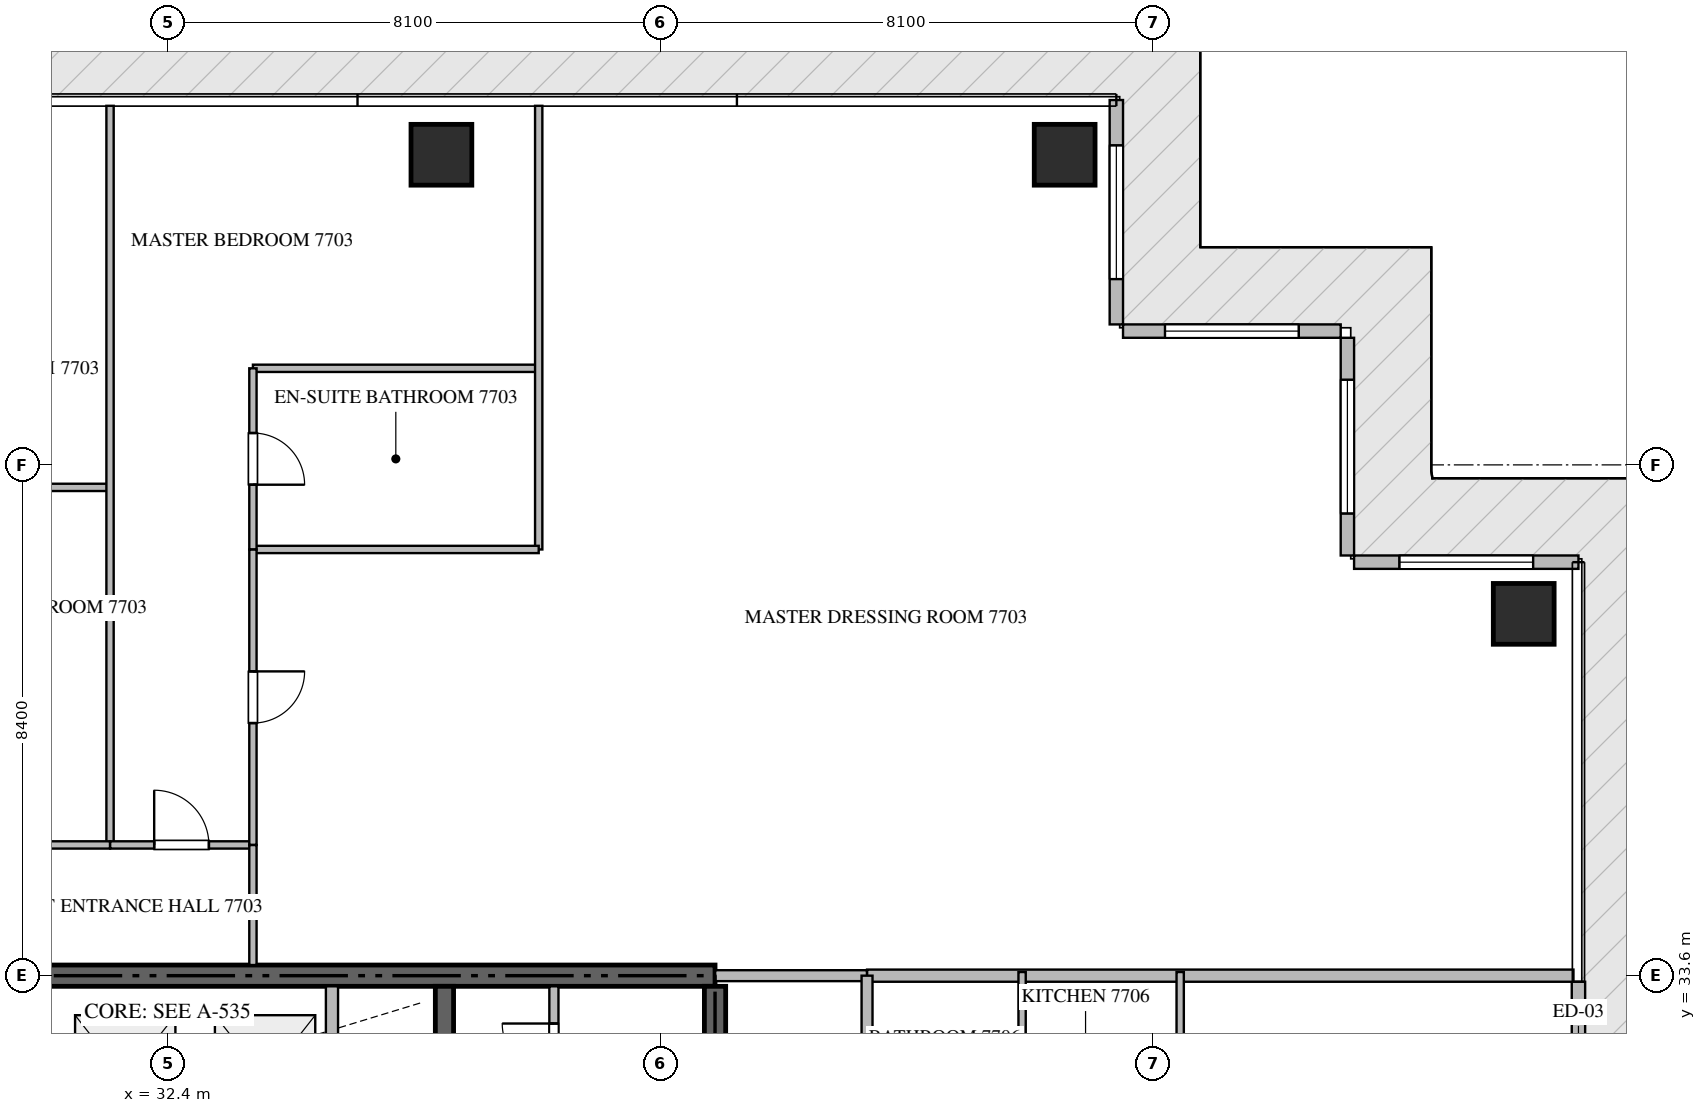
"""IFC4 building model, lengths in metres.
Left out: names, types, materials, properties, quantities, classifications, styles, units other than length and angle.
Written with IfcOpenShell. Run it as: python <this file> out.ifc"""

import sys

from ifc_helpers import new_model, si_unit, direction, frame, frame_2d, origin, origin_2d, place, context, subcontext, project, spatial, rectangle, extrude, source, transform, mapped, element, fill, save


model = new_model("IFC4")
c1 = context("Model", 3, precision=1e-05, world=origin(), true_north=direction((0.0, 1.0)))
c2 = subcontext(c1, "Body", "Model", "MODEL_VIEW")
j1 = project(units=[si_unit("LENGTHUNIT", "METRE"), si_unit("PLANEANGLEUNIT", "RADIAN")], contexts=[c1])
p1 = place(None, origin())
s1 = spatial("IfcSite", under=j1, at=p1, CompositionType="ELEMENT")
p2 = place(p1, origin())
s2 = spatial("IfcBuilding", under=s1, at=p2, CompositionType="ELEMENT")
p3 = place(p2, frame((0.0, 0.0, 309.65)))
s3 = spatial("IfcBuildingStorey", under=s2, at=p3, CompositionType="ELEMENT", Elevation=309.65)
p4 = place(p3, frame((41.4, 33.6, -0.26), z_axis=(0.0, 0.0, 1.0), x_axis=(-1.0, 0.0, 0.0)))
e1 = element("IfcWall", 1, at=p4, inside=s3, PredefinedType="SHEAR", context=c2, shape_type="SweptSolid", body=[
    extrude(rectangle(XDim=18.0, YDim=0.35, at=frame_2d((9.0, 0.0))), origin(), (0.0, 0.0, 1.0), 4.048),
])
p5 = place(p3, frame((41.4, 27.75, -0.26), z_axis=(0.0, 0.0, 1.0), x_axis=(0.0, 1.0, 0.0)))
e2 = element("IfcWall", 2, at=p5, inside=s3, PredefinedType="SHEAR", context=c2, shape_type="SweptSolid", body=[
    extrude(rectangle(XDim=5.675, YDim=0.35, at=frame_2d((2.837, 0.0))), origin(), (0.0, 0.0, 1.0), 4.048),
])
p6 = place(p3, frame((36.95, 27.05, -0.26), z_axis=(0.0, 0.0, 1.0), x_axis=(0.0, 1.0, 0.0)))
e3 = element("IfcWall", 3, at=p6, inside=s3, PredefinedType="SHEAR", context=c2, shape_type="SweptSolid", body=[
    extrude(rectangle(XDim=6.375, YDim=0.3, at=frame_2d((3.188, 0.0))), origin(), (0.0, 0.0, 1.0), 4.048),
])
m1 = source(origin(), c2, "Body", "SweptSolid", [
    extrude(rectangle(XDim=1.0, YDim=1.0, at=origin_2d()), origin(), (0.0, 0.0, 1.0), 4.05),
])
for number, where, z_axis, x_axis in (
    (4, (36.9, 47.1, -0.26), (0.0, 0.0, 1.0), (1.0, 0.0, 0.0)),
    (5, (47.15, 47.1, -0.26), (0.0, 0.0, 1.0), (1.0, 0.0, 0.0)),
    (6, (54.7, 39.55, -0.26), (0.0, 0.0, 1.0), (1.0, 0.0, 0.0)),
):
    element("IfcColumn", number, at=place(p3, frame(where, z_axis=z_axis, x_axis=x_axis)), inside=s3, PredefinedType="COLUMN", context=c2, shape_type="MappedRepresentation", body=[
        mapped(m1, transform((0.0, 0.0, 0.0), scale=1.0)),
    ])
p7 = place(p3, frame((55.6, 30.5, 0.0), z_axis=(0.0, 0.0, 1.0), x_axis=(0.0, 1.0, 0.0)))
e7 = element("IfcWall", 7, at=p7, inside=s3, PredefinedType="ELEMENTEDWALL", context=c2, shape_type="SweptSolid", body=[
    extrude(rectangle(XDim=3.0, YDim=0.22, at=frame_2d((1.5, 0.0))), origin(), (0.0, 0.0, 1.0), 3.775),
])
p8 = place(p7, frame((0.95, 0.0, 0.0)))
e8 = element("IfcOpeningElement", 8, at=p8, cuts=e7, PredefinedType="OPENING", context=c2, shape_type="SweptSolid", body=[
    extrude(rectangle(XDim=1.1, YDim=2.2, at=frame_2d((0.55, 1.1))), frame((0.0, 0.12, 0.0), z_axis=(0.0, -1.0, 0.0), x_axis=(1.0, 0.0, 0.0)), (0.0, 0.0, 1.0), 0.24),
])
p9 = place(p3, frame((55.6, 40.4, 0.0), z_axis=(0.0, 0.0, 1.0), x_axis=(-1.0, 0.0, 0.0)))
e9 = element("IfcWall", 9, at=p9, inside=s3, PredefinedType="ELEMENTEDWALL", context=c2, shape_type="SweptSolid", body=[
    extrude(rectangle(XDim=3.69, YDim=0.22, at=frame_2d((1.845, 0.0))), origin(), (0.0, 0.0, 1.0), 3.775),
])
p10 = place(p9, frame((0.745, 0.0, 0.65)))
e10 = element("IfcOpeningElement", 10, at=p10, cuts=e9, PredefinedType="OPENING", context=c2, shape_type="SweptSolid", body=[
    extrude(rectangle(XDim=2.2, YDim=2.4, at=frame_2d((1.1, 1.2))), frame((0.0, 0.12, 0.0), z_axis=(0.0, -1.0, 0.0), x_axis=(1.0, 0.0, 0.0)), (0.0, 0.0, 1.0), 0.24),
])
p11 = place(p3, frame((51.8, 40.51, 0.0), z_axis=(0.0, 0.0, 1.0), x_axis=(0.0, 1.0, 0.0)))
e11 = element("IfcWall", 11, at=p11, inside=s3, PredefinedType="ELEMENTEDWALL", context=c2, shape_type="SweptSolid", body=[
    extrude(rectangle(XDim=3.58, YDim=0.22, at=frame_2d((1.79, 0.0))), origin(), (0.0, 0.0, 1.0), 3.775),
])
p12 = place(p11, frame((0.69, 0.0, 0.65)))
e12 = element("IfcOpeningElement", 12, at=p12, cuts=e11, PredefinedType="OPENING", context=c2, shape_type="SweptSolid", body=[
    extrude(rectangle(XDim=2.2, YDim=2.4, at=frame_2d((1.1, 1.2))), frame((0.0, 0.12, 0.0), z_axis=(0.0, -1.0, 0.0), x_axis=(1.0, 0.0, 0.0)), (0.0, 0.0, 1.0), 0.24),
])
p13 = place(p3, frame((51.69, 44.2, 0.0), z_axis=(0.0, 0.0, 1.0), x_axis=(-1.0, 0.0, 0.0)))
e13 = element("IfcWall", 13, at=p13, inside=s3, PredefinedType="ELEMENTEDWALL", context=c2, shape_type="SweptSolid", body=[
    extrude(rectangle(XDim=3.58, YDim=0.22, at=frame_2d((1.79, 0.0))), origin(), (0.0, 0.0, 1.0), 3.775),
])
p14 = place(p13, frame((0.69, 0.0, 0.65)))
e14 = element("IfcOpeningElement", 14, at=p14, cuts=e13, PredefinedType="OPENING", context=c2, shape_type="SweptSolid", body=[
    extrude(rectangle(XDim=2.2, YDim=2.4, at=frame_2d((1.1, 1.2))), frame((0.0, 0.12, 0.0), z_axis=(0.0, -1.0, 0.0), x_axis=(1.0, 0.0, 0.0)), (0.0, 0.0, 1.0), 0.24),
])
p15 = place(p3, frame((48.0, 44.31, 0.0), z_axis=(0.0, 0.0, 1.0), x_axis=(0.0, 1.0, 0.0)))
e15 = element("IfcWall", 15, at=p15, inside=s3, PredefinedType="ELEMENTEDWALL", context=c2, shape_type="SweptSolid", body=[
    extrude(rectangle(XDim=3.69, YDim=0.22, at=frame_2d((1.845, 0.0))), origin(), (0.0, 0.0, 1.0), 3.775),
])
p16 = place(p15, frame((0.745, 0.0, 0.65)))
e16 = element("IfcOpeningElement", 16, at=p16, cuts=e15, PredefinedType="OPENING", context=c2, shape_type="SweptSolid", body=[
    extrude(rectangle(XDim=2.2, YDim=2.4, at=frame_2d((1.1, 1.2))), frame((0.0, 0.12, 0.0), z_axis=(0.0, -1.0, 0.0), x_axis=(1.0, 0.0, 0.0)), (0.0, 0.0, 1.0), 0.24),
])
p17 = place(p3, frame((35.1, 30.75, 0.0), z_axis=(0.0, 0.0, 1.0), x_axis=(0.0, 1.0, 0.0)))
e17 = element("IfcWall", 17, at=p17, inside=s3, PredefinedType="STANDARD", context=c2, shape_type="SweptSolid", body=[
    extrude(rectangle(XDim=2.675, YDim=0.2, at=frame_2d((1.337, 0.0))), origin(), (0.0, 0.0, 1.0), 3.79),
])
p18 = place(p3, frame((38.75, 31.352, 0.0), z_axis=(0.0, 0.0, 1.0), x_axis=(0.0, 1.0, 0.0)))
e18 = element("IfcWall", 18, at=p18, inside=s3, PredefinedType="PARTITIONING", context=c2, shape_type="SweptSolid", body=[
    extrude(rectangle(XDim=2.073, YDim=0.15, at=frame_2d((1.037, 0.0))), origin(), (0.0, 0.0, 1.0), 3.79),
])
p19 = place(p18, frame((0.611, 0.0, 0.0)))
e19 = element("IfcOpeningElement", 19, at=p19, cuts=e18, PredefinedType="OPENING", context=c2, shape_type="SweptSolid", body=[
    extrude(rectangle(XDim=0.85, YDim=2.1, at=frame_2d((0.425, 1.05))), frame((0.0, 0.085, 0.0), z_axis=(0.0, -1.0, 0.0), x_axis=(1.0, 0.0, 0.0)), (0.0, 0.0, 1.0), 0.17),
])
p20 = place(p3, frame((43.9, 33.6, 0.0), z_axis=(0.0, 0.0, 1.0), x_axis=(1.0, 0.0, 0.0)))
e20 = element("IfcWall", 20, at=p20, inside=s3, PredefinedType="PARTITIONING", context=c2, shape_type="SweptSolid", body=[
    extrude(rectangle(XDim=11.618, YDim=0.2, at=frame_2d((5.809, 0.0))), origin(), (0.0, 0.0, 1.0), 3.79),
])
p21 = place(p3, frame((41.402, 33.6, 0.0), z_axis=(0.0, 0.0, 1.0), x_axis=(1.0, 0.0, 0.0)))
e21 = element("IfcWall", 21, at=p21, inside=s3, PredefinedType="PARTITIONING", context=c2, shape_type="SweptSolid", body=[
    extrude(rectangle(XDim=2.496, YDim=0.18, at=frame_2d((1.248, 0.0))), origin(), (0.0, 0.0, 1.0), 3.79),
])
p22 = place(p3, frame((43.9, 16.8, 0.0), z_axis=(0.0, 0.0, 1.0), x_axis=(0.0, 1.0, 0.0)))
e22 = element("IfcWall", 22, at=p22, inside=s3, PredefinedType="PARTITIONING", context=c2, shape_type="SweptSolid", body=[
    extrude(rectangle(XDim=16.8, YDim=0.18, at=frame_2d((8.4, 0.0))), origin(), (0.0, 0.0, 1.0), 3.79),
])
p23 = place(p22, frame((2.575, 0.0, 0.0)))
e23 = element("IfcOpeningElement", 23, at=p23, cuts=e22, PredefinedType="OPENING", context=c2, shape_type="SweptSolid", body=[
    extrude(rectangle(XDim=1.0, YDim=2.15, at=frame_2d((0.5, 1.075))), frame((0.0, 0.1, 0.0), z_axis=(0.0, -1.0, 0.0), x_axis=(1.0, 0.0, 0.0)), (0.0, 0.0, 1.0), 0.2),
])
p24 = place(p22, frame((10.997, 0.0, 0.0)))
e24 = element("IfcOpeningElement", 24, at=p24, cuts=e22, PredefinedType="OPENING", context=c2, shape_type="SweptSolid", body=[
    extrude(rectangle(XDim=1.0, YDim=2.15, at=frame_2d((0.5, 1.075))), frame((0.0, 0.1, 0.0), z_axis=(0.0, -1.0, 0.0), x_axis=(1.0, 0.0, 0.0)), (0.0, 0.0, 1.0), 0.2),
])
p25 = place(p3, frame((26.3, 41.63, 0.0), z_axis=(0.0, 0.0, 1.0), x_axis=(1.0, 0.0, 0.0)))
e25 = element("IfcWall", 25, at=p25, inside=s3, PredefinedType="PARTITIONING", context=c2, shape_type="SweptSolid", body=[
    extrude(rectangle(XDim=5.15, YDim=0.12, at=frame_2d((2.575, 0.0))), origin(), (0.0, 0.0, 1.0), 3.79),
])
p26 = place(p3, frame((31.45, 47.905, 0.0), z_axis=(0.0, 0.0, 1.0), x_axis=(0.0, -1.0, 0.0)))
e26 = element("IfcWall", 26, at=p26, inside=s3, PredefinedType="PARTITIONING", context=c2, shape_type="SweptSolid", body=[
    extrude(rectangle(XDim=12.155, YDim=0.12, at=frame_2d((6.078, 0.0))), origin(), (0.0, 0.0, 1.0), 3.79),
])
p27 = place(p3, frame((28.402, 35.75, 0.0), z_axis=(0.0, 0.0, 1.0), x_axis=(1.0, 0.0, 0.0)))
e27 = element("IfcWall", 27, at=p27, inside=s3, PredefinedType="PARTITIONING", context=c2, shape_type="SweptSolid", body=[
    extrude(rectangle(XDim=3.048, YDim=0.12, at=frame_2d((1.524, 0.0))), origin(), (0.0, 0.0, 1.0), 3.79),
])
p28 = place(p27, frame((1.099, 0.0, 0.0)))
e28 = element("IfcOpeningElement", 28, at=p28, cuts=e27, PredefinedType="OPENING", context=c2, shape_type="SweptSolid", body=[
    extrude(rectangle(XDim=0.85, YDim=2.1, at=frame_2d((0.425, 1.05))), frame((0.0, 0.07, 0.0), z_axis=(0.0, -1.0, 0.0), x_axis=(1.0, 0.0, 0.0)), (0.0, 0.0, 1.0), 0.14),
])
p29 = place(p3, frame((31.452, 35.75, 0.0), z_axis=(0.0, 0.0, 1.0), x_axis=(1.0, 0.0, 0.0)))
e29 = element("IfcWall", 29, at=p29, inside=s3, PredefinedType="PARTITIONING", context=c2, shape_type="SweptSolid", body=[
    extrude(rectangle(XDim=2.348, YDim=0.12, at=frame_2d((1.174, 0.0))), origin(), (0.0, 0.0, 1.0), 3.79),
])
p30 = place(p29, frame((0.724, 0.0, 0.0)))
e30 = element("IfcOpeningElement", 30, at=p30, cuts=e29, PredefinedType="OPENING", context=c2, shape_type="SweptSolid", body=[
    extrude(rectangle(XDim=0.9, YDim=2.1, at=frame_2d((0.45, 1.05))), frame((0.0, 0.07, 0.0), z_axis=(0.0, -1.0, 0.0), x_axis=(1.0, 0.0, 0.0)), (0.0, 0.0, 1.0), 0.14),
])
p31 = place(p3, frame((33.8, 43.588, 0.0), z_axis=(0.0, 0.0, 1.0), x_axis=(1.0, 0.0, 0.0)))
e31 = element("IfcWall", 31, at=p31, inside=s3, PredefinedType="PARTITIONING", context=c2, shape_type="SweptSolid", body=[
    extrude(rectangle(XDim=4.7, YDim=0.12, at=frame_2d((2.35, 0.0))), origin(), (0.0, 0.0, 1.0), 3.79),
])
p32 = place(p3, frame((38.5, 47.905, 0.0), z_axis=(0.0, 0.0, 1.0), x_axis=(0.0, -1.0, 0.0)))
e32 = element("IfcWall", 32, at=p32, inside=s3, PredefinedType="PARTITIONING", context=c2, shape_type="SweptSolid", body=[
    extrude(rectangle(XDim=7.296, YDim=0.12, at=frame_2d((3.648, 0.0))), origin(), (0.0, 0.0, 1.0), 3.79),
])
p33 = place(p3, frame((33.8, 40.609, 0.0), z_axis=(0.0, 0.0, 1.0), x_axis=(1.0, 0.0, 0.0)))
e33 = element("IfcWall", 33, at=p33, inside=s3, PredefinedType="PARTITIONING", context=c2, shape_type="SweptSolid", body=[
    extrude(rectangle(XDim=4.7, YDim=0.12, at=frame_2d((2.35, 0.0))), origin(), (0.0, 0.0, 1.0), 3.79),
])
p34 = place(p3, frame((33.8, 43.588, 0.0), z_axis=(0.0, 0.0, 1.0), x_axis=(0.0, -1.0, 0.0)))
e34 = element("IfcWall", 34, at=p34, inside=s3, PredefinedType="PARTITIONING", context=c2, shape_type="SweptSolid", body=[
    extrude(rectangle(XDim=2.979, YDim=0.12, at=frame_2d((1.49, 0.0))), origin(), (0.0, 0.0, 1.0), 3.79),
])
p35 = place(p34, frame((1.064, 0.0, 0.0)))
e35 = element("IfcOpeningElement", 35, at=p35, cuts=e34, PredefinedType="OPENING", context=c2, shape_type="SweptSolid", body=[
    extrude(rectangle(XDim=0.85, YDim=2.1, at=frame_2d((0.425, 1.05))), frame((0.0, 0.07, 0.0), z_axis=(0.0, -1.0, 0.0), x_axis=(1.0, 0.0, 0.0)), (0.0, 0.0, 1.0), 0.14),
])
p36 = place(p3, frame((33.8, 40.607, 0.0), z_axis=(0.0, 0.0, 1.0), x_axis=(0.0, -1.0, 0.0)))
e36 = element("IfcWall", 36, at=p36, inside=s3, PredefinedType="PARTITIONING", context=c2, shape_type="SweptSolid", body=[
    extrude(rectangle(XDim=4.857, YDim=0.12, at=frame_2d((2.428, 0.0))), origin(), (0.0, 0.0, 1.0), 3.79),
])
p37 = place(p36, frame((2.003, 0.0, 0.0)))
e37 = element("IfcOpeningElement", 37, at=p37, cuts=e36, PredefinedType="OPENING", context=c2, shape_type="SweptSolid", body=[
    extrude(rectangle(XDim=0.85, YDim=2.1, at=frame_2d((0.425, 1.05))), frame((0.0, 0.07, 0.0), z_axis=(0.0, -1.0, 0.0), x_axis=(1.0, 0.0, 0.0)), (0.0, 0.0, 1.0), 0.14),
])
p38 = place(p3, frame((33.8, 35.748, 0.0), z_axis=(0.0, 0.0, 1.0), x_axis=(0.0, -1.0, 0.0)))
e38 = element("IfcWall", 38, at=p38, inside=s3, PredefinedType="PARTITIONING", context=c2, shape_type="SweptSolid", body=[
    extrude(rectangle(XDim=1.973, YDim=0.12, at=frame_2d((0.987, 0.0))), origin(), (0.0, 0.0, 1.0), 3.79),
])
for number, where, z_axis, x_axis in (
    (39, (46.45, 31.0, 0.0), (0.0, 0.0, 1.0), (0.0, 1.0, 0.0)),
    (40, (49.05, 31.0, 0.0), (0.0, 0.0, 1.0), (0.0, 1.0, 0.0)),
):
    element("IfcWall", number, at=place(p3, frame(where, z_axis=z_axis, x_axis=x_axis)), inside=s3, PredefinedType="PARTITIONING", context=c2, shape_type="SweptSolid", body=[
        extrude(rectangle(XDim=2.66, YDim=0.12, at=frame_2d((1.33, 0.0))), origin(), (0.0, 0.0, 1.0), 3.79),
    ])
m2 = source(origin(), c2, "Body", "SweptSolid", [
    extrude(rectangle(XDim=2.2, YDim=2.4, at=frame_2d((1.1, 1.2))), frame((0.0, 0.03, 0.0), z_axis=(0.0, -1.0, 0.0), x_axis=(1.0, 0.0, 0.0)), (0.0, 0.0, 1.0), 0.06),
])
p39 = place(p10, origin())
e41 = element("IfcWindow", 41, at=p39, inside=s3, PartitioningType="SINGLE_PANEL", PredefinedType="WINDOW", context=c2, shape_type="MappedRepresentation", body=[
    mapped(m2, transform((0.0, 0.0, 0.0), scale=1.0)),
])
fill(e10, e41)
p40 = place(p12, origin())
e42 = element("IfcWindow", 42, at=p40, inside=s3, PartitioningType="SINGLE_PANEL", PredefinedType="WINDOW", context=c2, shape_type="MappedRepresentation", body=[
    mapped(m2, transform((0.0, 0.0, 0.0), scale=1.0)),
])
fill(e12, e42)
p41 = place(p14, origin())
e43 = element("IfcWindow", 43, at=p41, inside=s3, PartitioningType="SINGLE_PANEL", PredefinedType="WINDOW", context=c2, shape_type="MappedRepresentation", body=[
    mapped(m2, transform((0.0, 0.0, 0.0), scale=1.0)),
])
fill(e14, e43)
p42 = place(p16, origin())
e44 = element("IfcWindow", 44, at=p42, inside=s3, PartitioningType="SINGLE_PANEL", PredefinedType="WINDOW", context=c2, shape_type="MappedRepresentation", body=[
    mapped(m2, transform((0.0, 0.0, 0.0), scale=1.0)),
])
fill(e16, e44)
m3 = source(origin(), c2, "Body", "SweptSolid", [
    extrude(rectangle(XDim=0.85, YDim=2.1, at=frame_2d((0.425, 1.05))), frame((0.0, 0.025, 0.0), z_axis=(0.0, -1.0, 0.0), x_axis=(1.0, 0.0, 0.0)), (0.0, 0.0, 1.0), 0.05),
])
p43 = place(p19, origin())
e45 = element("IfcDoor", 45, at=p43, inside=s3, OperationType="SINGLE_SWING_RIGHT", PredefinedType="DOOR", context=c2, shape_type="MappedRepresentation", body=[
    mapped(m3, transform((0.0, 0.0, 0.0), scale=1.0)),
])
fill(e19, e45)
m4 = source(origin(), c2, "Body", "SweptSolid", [
    extrude(rectangle(XDim=0.9, YDim=2.1, at=frame_2d((0.45, 1.05))), frame((0.0, 0.025, 0.0), z_axis=(0.0, -1.0, 0.0), x_axis=(1.0, 0.0, 0.0)), (0.0, 0.0, 1.0), 0.05),
])
p44 = place(p30, origin())
e46 = element("IfcDoor", 46, at=p44, inside=s3, OperationType="SINGLE_SWING_LEFT", PredefinedType="DOOR", context=c2, shape_type="MappedRepresentation", body=[
    mapped(m4, transform((0.0, 0.0, 0.0), scale=1.0)),
])
fill(e30, e46)
p45 = place(p35, origin())
e47 = element("IfcDoor", 47, at=p45, inside=s3, OperationType="SINGLE_SWING_RIGHT", PredefinedType="DOOR", context=c2, shape_type="MappedRepresentation", body=[
    mapped(m3, transform((0.0, 0.0, 0.0), scale=1.0)),
])
fill(e35, e47)
p46 = place(p37, origin())
e48 = element("IfcDoor", 48, at=p46, inside=s3, OperationType="SINGLE_SWING_LEFT", PredefinedType="DOOR", context=c2, shape_type="MappedRepresentation", body=[
    mapped(m3, transform((0.0, 0.0, 0.0), scale=1.0)),
])
fill(e37, e48)
save(model, sys.argv[1])
